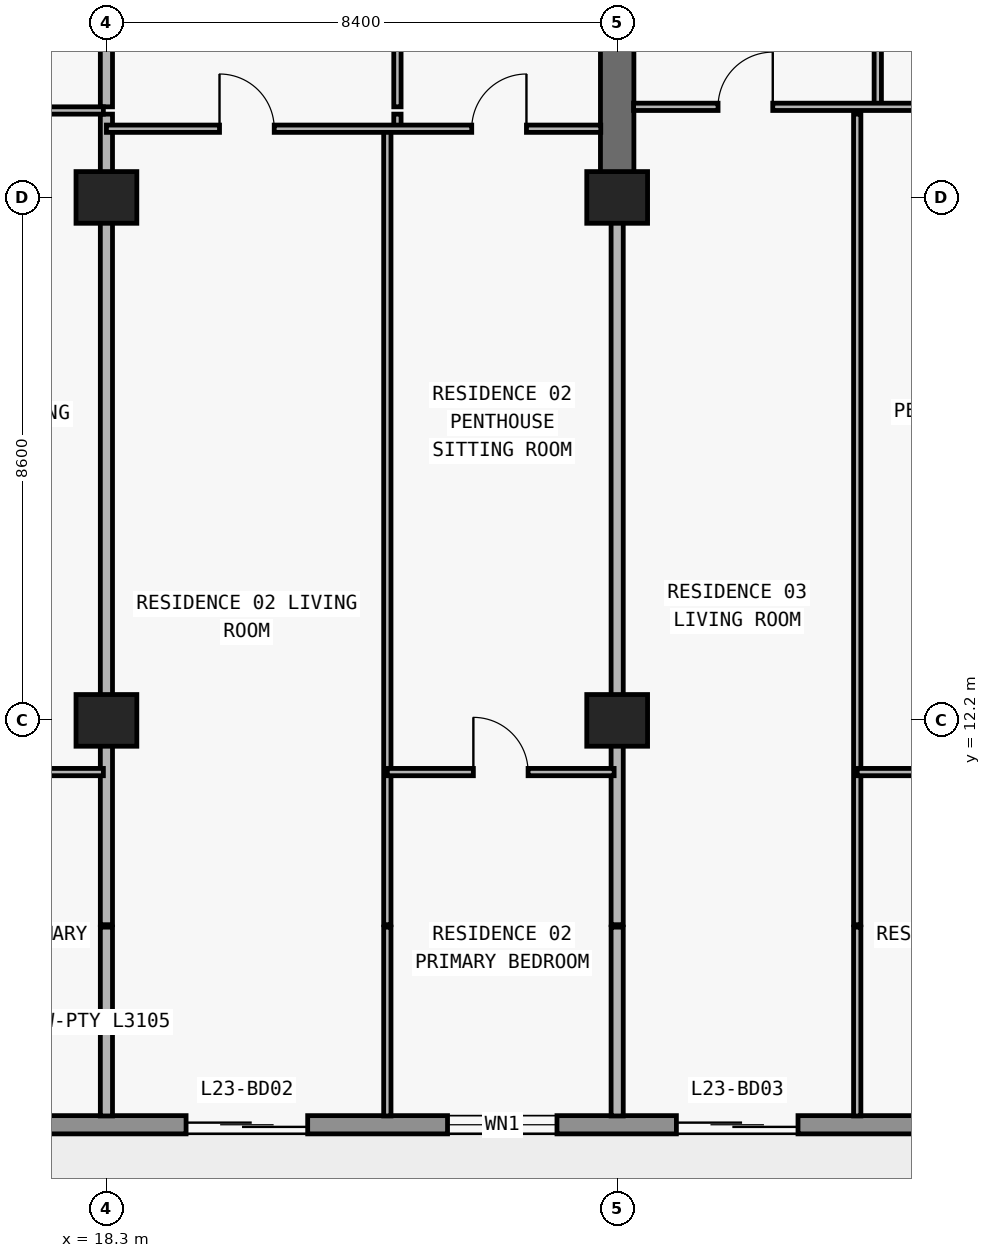
"""IFC4 building model, lengths in metres.
Left out: names, types, materials, properties, quantities, classifications, styles, units other than length and angle.
Written with IfcOpenShell. Run it as: python <this file> out.ifc"""

import sys

from ifc_helpers import new_model, si_unit, direction, frame, frame_2d, origin, origin_2d, place, context, subcontext, project, spatial, rectangle, extrude, element, fill, save


model = new_model("IFC4")
c1 = context("Model", 3, precision=1e-05, world=origin(), true_north=direction((0.0, 1.0)))
c2 = subcontext(c1, "Body", "Model", "MODEL_VIEW")
j1 = project(units=[si_unit("LENGTHUNIT", "METRE"), si_unit("PLANEANGLEUNIT", "RADIAN")], contexts=[c1])
p1 = place(None, origin())
s1 = spatial("IfcSite", under=j1, at=p1, CompositionType="ELEMENT")
p2 = place(p1, origin())
s2 = spatial("IfcBuilding", under=s1, at=p2, CompositionType="ELEMENT")
p3 = place(p2, frame((0.0, 0.0, 87.9)))
s3 = spatial("IfcBuildingStorey", under=s2, at=p3, CompositionType="ELEMENT", Elevation=87.9)
for number, where, z_axis, x_axis in (
    (1, (18.3, 12.2, 0.0), (0.0, 0.0, 1.0), (1.0, 0.0, 0.0)),
    (2, (26.7, 12.2, 0.0), (0.0, 0.0, 1.0), (1.0, 0.0, 0.0)),
    (3, (18.3, 20.8, 0.0), (0.0, 0.0, 1.0), (1.0, 0.0, 0.0)),
    (4, (26.7, 20.8, 0.0), (0.0, 0.0, 1.0), (1.0, 0.0, 0.0)),
):
    element("IfcColumn", number, at=place(p3, frame(where, z_axis=z_axis, x_axis=x_axis)), inside=s3, PredefinedType="COLUMN", context=c2, shape_type="SweptSolid", body=[
        extrude(rectangle(XDim=1.0, YDim=0.85, at=origin_2d()), origin(), (0.0, 0.0, 1.0), 3.05),
    ])
p4 = place(p3, frame((26.7, 20.8, 0.0), z_axis=(0.0, 0.0, 1.0), x_axis=(0.0, 1.0, 0.0)))
e5 = element("IfcWall", 5, at=p4, inside=s3, PredefinedType="SHEAR", context=c2, shape_type="SweptSolid", body=[
    extrude(rectangle(XDim=8.6, YDim=0.55, at=frame_2d((4.3, 0.0))), origin(), (0.0, 0.0, 1.0), 3.05),
])
p5 = place(p3, frame((70.1, 5.55, 0.0), z_axis=(0.0, 0.0, 1.0), x_axis=(-1.0, 0.0, 0.0)))
e6 = element("IfcWall", 6, at=p5, inside=s3, PredefinedType="STANDARD", context=c2, shape_type="SweptSolid", body=[
    extrude(rectangle(XDim=62.4, YDim=0.3, at=frame_2d((31.2, 0.0))), origin(), (0.0, 0.0, 1.0), 3.05),
])
p6 = place(p5, frame((57.226, 0.0, 0.0)))
e7 = element("IfcOpeningElement", 7, at=p6, cuts=e6, PredefinedType="OPENING", context=c2, shape_type="SweptSolid", body=[
    extrude(rectangle(XDim=2.0, YDim=2.3, at=frame_2d((1.0, 1.15))), frame((0.0, 0.16, 0.0), z_axis=(0.0, -1.0, 0.0), x_axis=(1.0, 0.0, 0.0)), (0.0, 0.0, 1.0), 0.32),
])
p7 = place(p5, frame((52.926, 0.0, 0.85)))
e8 = element("IfcOpeningElement", 8, at=p7, cuts=e6, PredefinedType="OPENING", context=c2, shape_type="SweptSolid", body=[
    extrude(rectangle(XDim=2.2, YDim=1.55, at=frame_2d((1.1, 0.775))), frame((0.0, 0.16, 0.0), z_axis=(0.0, -1.0, 0.0), x_axis=(1.0, 0.0, 0.0)), (0.0, 0.0, 1.0), 0.32),
])
p8 = place(p5, frame((48.49, 0.0, 0.0)))
e9 = element("IfcOpeningElement", 9, at=p8, cuts=e6, PredefinedType="OPENING", context=c2, shape_type="SweptSolid", body=[
    extrude(rectangle(XDim=2.0, YDim=2.3, at=frame_2d((1.0, 1.15))), frame((0.0, 0.16, 0.0), z_axis=(0.0, -1.0, 0.0), x_axis=(1.0, 0.0, 0.0)), (0.0, 0.0, 1.0), 0.32),
])
p9 = place(p5, frame((44.39, 0.0, 0.85)))
e10 = element("IfcOpeningElement", 10, at=p9, cuts=e6, PredefinedType="OPENING", context=c2, shape_type="SweptSolid", body=[
    extrude(rectangle(XDim=1.8, YDim=1.55, at=frame_2d((0.9, 0.775))), frame((0.0, 0.16, 0.0), z_axis=(0.0, -1.0, 0.0), x_axis=(1.0, 0.0, 0.0)), (0.0, 0.0, 1.0), 0.32),
])
p10 = place(p5, frame((40.426, 0.0, 0.0)))
e11 = element("IfcOpeningElement", 11, at=p10, cuts=e6, PredefinedType="OPENING", context=c2, shape_type="SweptSolid", body=[
    extrude(rectangle(XDim=2.0, YDim=2.3, at=frame_2d((1.0, 1.15))), frame((0.0, 0.16, 0.0), z_axis=(0.0, -1.0, 0.0), x_axis=(1.0, 0.0, 0.0)), (0.0, 0.0, 1.0), 0.32),
])
p11 = place(p5, frame((36.126, 0.0, 0.85)))
e12 = element("IfcOpeningElement", 12, at=p11, cuts=e6, PredefinedType="OPENING", context=c2, shape_type="SweptSolid", body=[
    extrude(rectangle(XDim=2.2, YDim=1.55, at=frame_2d((1.1, 0.775))), frame((0.0, 0.16, 0.0), z_axis=(0.0, -1.0, 0.0), x_axis=(1.0, 0.0, 0.0)), (0.0, 0.0, 1.0), 0.32),
])
p12 = place(p5, frame((32.09, 0.0, 0.0)))
e13 = element("IfcOpeningElement", 13, at=p12, cuts=e6, PredefinedType="OPENING", context=c2, shape_type="SweptSolid", body=[
    extrude(rectangle(XDim=2.0, YDim=2.3, at=frame_2d((1.0, 1.15))), frame((0.0, 0.16, 0.0), z_axis=(0.0, -1.0, 0.0), x_axis=(1.0, 0.0, 0.0)), (0.0, 0.0, 1.0), 0.32),
])
p13 = place(p5, frame((28.21, 0.0, 0.65)))
e14 = element("IfcOpeningElement", 14, at=p13, cuts=e6, PredefinedType="OPENING", context=c2, shape_type="SweptSolid", body=[
    extrude(rectangle(XDim=2.6, YDim=1.85, at=frame_2d((1.3, 0.925))), frame((0.0, 0.16, 0.0), z_axis=(0.0, -1.0, 0.0), x_axis=(1.0, 0.0, 0.0)), (0.0, 0.0, 1.0), 0.32),
])
p14 = place(p5, frame((22.1, 0.0, 0.85)))
e15 = element("IfcOpeningElement", 15, at=p14, cuts=e6, PredefinedType="OPENING", context=c2, shape_type="SweptSolid", body=[
    extrude(rectangle(XDim=2.2, YDim=1.55, at=frame_2d((1.1, 0.775))), frame((0.0, 0.16, 0.0), z_axis=(0.0, -1.0, 0.0), x_axis=(1.0, 0.0, 0.0)), (0.0, 0.0, 1.0), 0.32),
])
p15 = place(p5, frame((16.026, 0.0, 0.0)))
e16 = element("IfcOpeningElement", 16, at=p15, cuts=e6, PredefinedType="OPENING", context=c2, shape_type="SweptSolid", body=[
    extrude(rectangle(XDim=2.0, YDim=2.3, at=frame_2d((1.0, 1.15))), frame((0.0, 0.16, 0.0), z_axis=(0.0, -1.0, 0.0), x_axis=(1.0, 0.0, 0.0)), (0.0, 0.0, 1.0), 0.32),
])
p16 = place(p5, frame((11.726, 0.0, 0.85)))
e17 = element("IfcOpeningElement", 17, at=p16, cuts=e6, PredefinedType="OPENING", context=c2, shape_type="SweptSolid", body=[
    extrude(rectangle(XDim=2.2, YDim=1.55, at=frame_2d((1.1, 0.775))), frame((0.0, 0.16, 0.0), z_axis=(0.0, -1.0, 0.0), x_axis=(1.0, 0.0, 0.0)), (0.0, 0.0, 1.0), 0.32),
])
p17 = place(p5, frame((7.29, 0.0, 0.0)))
e18 = element("IfcOpeningElement", 18, at=p17, cuts=e6, PredefinedType="OPENING", context=c2, shape_type="SweptSolid", body=[
    extrude(rectangle(XDim=2.0, YDim=2.3, at=frame_2d((1.0, 1.15))), frame((0.0, 0.16, 0.0), z_axis=(0.0, -1.0, 0.0), x_axis=(1.0, 0.0, 0.0)), (0.0, 0.0, 1.0), 0.32),
])
p18 = place(p5, frame((3.19, 0.0, 0.85)))
e19 = element("IfcOpeningElement", 19, at=p18, cuts=e6, PredefinedType="OPENING", context=c2, shape_type="SweptSolid", body=[
    extrude(rectangle(XDim=1.8, YDim=1.55, at=frame_2d((0.9, 0.775))), frame((0.0, 0.16, 0.0), z_axis=(0.0, -1.0, 0.0), x_axis=(1.0, 0.0, 0.0)), (0.0, 0.0, 1.0), 0.32),
])
p19 = place(p3, frame((18.3, 5.695, 0.0), z_axis=(0.0, 0.0, 1.0), x_axis=(0.0, 1.0, 0.0)))
e20 = element("IfcWall", 20, at=p19, inside=s3, PredefinedType="PARTITIONING", context=c2, shape_type="SweptSolid", body=[
    extrude(rectangle(XDim=3.105, YDim=0.2, at=frame_2d((1.552, 0.0))), origin(), (0.0, 0.0, 1.0), 3.05),
])
p20 = place(p3, frame((18.3, 8.84, 0.0), z_axis=(0.0, 0.0, 1.0), x_axis=(0.0, 1.0, 0.0)))
e21 = element("IfcWall", 21, at=p20, inside=s3, PredefinedType="PARTITIONING", context=c2, shape_type="SweptSolid", body=[
    extrude(rectangle(XDim=13.33, YDim=0.2, at=frame_2d((6.665, 0.0))), origin(), (0.0, 0.0, 1.0), 2.174),
])
p21 = place(p3, frame((18.3, 22.29, 0.0), z_axis=(0.0, 0.0, 1.0), x_axis=(0.0, 1.0, 0.0)))
e22 = element("IfcWall", 22, at=p21, inside=s3, PredefinedType="PARTITIONING", context=c2, shape_type="SweptSolid", body=[
    extrude(rectangle(XDim=4.69, YDim=0.2, at=frame_2d((2.345, 0.0))), origin(), (0.0, 0.0, 1.0), 2.174),
])
p22 = place(p3, frame((22.92, 5.695, 0.0), z_axis=(0.0, 0.0, 1.0), x_axis=(0.0, 1.0, 0.0)))
e23 = element("IfcWall", 23, at=p22, inside=s3, PredefinedType="PARTITIONING", context=c2, shape_type="SweptSolid", body=[
    extrude(rectangle(XDim=3.105, YDim=0.12, at=frame_2d((1.552, 0.0))), origin(), (0.0, 0.0, 1.0), 3.05),
])
p23 = place(p3, frame((22.92, 8.84, 0.0), z_axis=(0.0, 0.0, 1.0), x_axis=(0.0, 1.0, 0.0)))
e24 = element("IfcWall", 24, at=p23, inside=s3, PredefinedType="PARTITIONING", context=c2, shape_type="SweptSolid", body=[
    extrude(rectangle(XDim=13.09, YDim=0.12, at=frame_2d((6.545, 0.0))), origin(), (0.0, 0.0, 1.0), 3.05),
])
p24 = place(p3, frame((23.086, 21.935, 0.0), z_axis=(0.0, 0.0, 1.0), x_axis=(0.0, 1.0, 0.0)))
e25 = element("IfcWall", 25, at=p24, inside=s3, PredefinedType="PARTITIONING", context=c2, shape_type="SweptSolid", body=[
    extrude(rectangle(XDim=0.235, YDim=0.12, at=frame_2d((0.117, 0.0))), origin(), (0.0, 0.0, 1.0), 3.05),
])
p25 = place(p3, frame((23.086, 22.29, 0.0), z_axis=(0.0, 0.0, 1.0), x_axis=(0.0, 1.0, 0.0)))
e26 = element("IfcWall", 26, at=p25, inside=s3, PredefinedType="PARTITIONING", context=c2, shape_type="SweptSolid", body=[
    extrude(rectangle(XDim=4.69, YDim=0.12, at=frame_2d((2.345, 0.0))), origin(), (0.0, 0.0, 1.0), 3.05),
])
p26 = place(p25, frame((1.895, 0.0, 0.0)))
e27 = element("IfcOpeningElement", 27, at=p26, cuts=e26, PredefinedType="OPENING", context=c2, shape_type="SweptSolid", body=[
    extrude(rectangle(XDim=0.9, YDim=2.15, at=frame_2d((0.45, 1.075))), frame((0.0, 0.07, 0.0), z_axis=(0.0, -1.0, 0.0), x_axis=(1.0, 0.0, 0.0)), (0.0, 0.0, 1.0), 0.14),
])
p27 = place(p3, frame((26.7, 5.695, 0.0), z_axis=(0.0, 0.0, 1.0), x_axis=(0.0, 1.0, 0.0)))
e28 = element("IfcWall", 28, at=p27, inside=s3, PredefinedType="PARTITIONING", context=c2, shape_type="SweptSolid", body=[
    extrude(rectangle(XDim=3.105, YDim=0.2, at=frame_2d((1.552, 0.0))), origin(), (0.0, 0.0, 1.0), 3.05),
])
p28 = place(p3, frame((26.7, 8.84, 0.0), z_axis=(0.0, 0.0, 1.0), x_axis=(0.0, 1.0, 0.0)))
e29 = element("IfcWall", 29, at=p28, inside=s3, PredefinedType="PARTITIONING", context=c2, shape_type="SweptSolid", body=[
    extrude(rectangle(XDim=11.955, YDim=0.2, at=frame_2d((5.978, 0.0))), origin(), (0.0, 0.0, 1.0), 2.174),
])
p29 = place(p3, frame((30.648, 5.695, 0.0), z_axis=(0.0, 0.0, 1.0), x_axis=(0.0, 1.0, 0.0)))
e30 = element("IfcWall", 30, at=p29, inside=s3, PredefinedType="PARTITIONING", context=c2, shape_type="SweptSolid", body=[
    extrude(rectangle(XDim=3.105, YDim=0.12, at=frame_2d((1.552, 0.0))), origin(), (0.0, 0.0, 1.0), 3.05),
])
p30 = place(p3, frame((30.648, 8.84, 0.0), z_axis=(0.0, 0.0, 1.0), x_axis=(0.0, 1.0, 0.0)))
e31 = element("IfcWall", 31, at=p30, inside=s3, PredefinedType="PARTITIONING", context=c2, shape_type="SweptSolid", body=[
    extrude(rectangle(XDim=13.33, YDim=0.12, at=frame_2d((6.665, 0.0))), origin(), (0.0, 0.0, 1.0), 3.05),
])
p31 = place(p3, frame((30.986, 22.29, 0.0), z_axis=(0.0, 0.0, 1.0), x_axis=(0.0, 1.0, 0.0)))
e32 = element("IfcWall", 32, at=p31, inside=s3, PredefinedType="PARTITIONING", context=c2, shape_type="SweptSolid", body=[
    extrude(rectangle(XDim=4.69, YDim=0.12, at=frame_2d((2.345, 0.0))), origin(), (0.0, 0.0, 1.0), 3.05),
])
p32 = place(p31, frame((1.895, 0.0, 0.0)))
e33 = element("IfcOpeningElement", 33, at=p32, cuts=e32, PredefinedType="OPENING", context=c2, shape_type="SweptSolid", body=[
    extrude(rectangle(XDim=0.9, YDim=2.15, at=frame_2d((0.45, 1.075))), frame((0.0, 0.07, 0.0), z_axis=(0.0, -1.0, 0.0), x_axis=(1.0, 0.0, 0.0)), (0.0, 0.0, 1.0), 0.14),
])
p33 = place(p3, frame((13.848, 11.35, 0.0), z_axis=(0.0, 0.0, 1.0), x_axis=(1.0, 0.0, 0.0)))
e34 = element("IfcWall", 34, at=p33, inside=s3, PredefinedType="PARTITIONING", context=c2, shape_type="SweptSolid", body=[
    extrude(rectangle(XDim=4.402, YDim=0.12, at=frame_2d((2.201, 0.0))), origin(), (0.0, 0.0, 1.0), 3.05),
])
p34 = place(p33, frame((1.751, 0.0, 0.0)))
e35 = element("IfcOpeningElement", 35, at=p34, cuts=e34, PredefinedType="OPENING", context=c2, shape_type="SweptSolid", body=[
    extrude(rectangle(XDim=0.9, YDim=2.15, at=frame_2d((0.45, 1.075))), frame((0.0, 0.07, 0.0), z_axis=(0.0, -1.0, 0.0), x_axis=(1.0, 0.0, 0.0)), (0.0, 0.0, 1.0), 0.14),
])
p35 = place(p3, frame((22.92, 11.35, 0.0), z_axis=(0.0, 0.0, 1.0), x_axis=(1.0, 0.0, 0.0)))
e36 = element("IfcWall", 36, at=p35, inside=s3, PredefinedType="PARTITIONING", context=c2, shape_type="SweptSolid", body=[
    extrude(rectangle(XDim=3.73, YDim=0.12, at=frame_2d((1.865, 0.0))), origin(), (0.0, 0.0, 1.0), 3.05),
])
p36 = place(p35, frame((1.415, 0.0, 0.0)))
e37 = element("IfcOpeningElement", 37, at=p36, cuts=e36, PredefinedType="OPENING", context=c2, shape_type="SweptSolid", body=[
    extrude(rectangle(XDim=0.9, YDim=2.15, at=frame_2d((0.45, 1.075))), frame((0.0, 0.07, 0.0), z_axis=(0.0, -1.0, 0.0), x_axis=(1.0, 0.0, 0.0)), (0.0, 0.0, 1.0), 0.14),
])
p37 = place(p3, frame((30.648, 11.35, 0.0), z_axis=(0.0, 0.0, 1.0), x_axis=(1.0, 0.0, 0.0)))
e38 = element("IfcWall", 38, at=p37, inside=s3, PredefinedType="PARTITIONING", context=c2, shape_type="SweptSolid", body=[
    extrude(rectangle(XDim=4.452, YDim=0.12, at=frame_2d((2.226, 0.0))), origin(), (0.0, 0.0, 1.0), 3.05),
])
p38 = place(p37, frame((1.776, 0.0, 0.0)))
e39 = element("IfcOpeningElement", 39, at=p38, cuts=e38, PredefinedType="OPENING", context=c2, shape_type="SweptSolid", body=[
    extrude(rectangle(XDim=0.9, YDim=2.15, at=frame_2d((0.45, 1.075))), frame((0.0, 0.07, 0.0), z_axis=(0.0, -1.0, 0.0), x_axis=(1.0, 0.0, 0.0)), (0.0, 0.0, 1.0), 0.14),
])
p39 = place(p3, frame((18.3, 21.93, 0.0), z_axis=(0.0, 0.0, 1.0), x_axis=(1.0, 0.0, 0.0)))
e40 = element("IfcWall", 40, at=p39, inside=s3, PredefinedType="PARTITIONING", context=c2, shape_type="SweptSolid", body=[
    extrude(rectangle(XDim=8.13, YDim=0.12, at=frame_2d((4.065, 0.0))), origin(), (0.0, 0.0, 1.0), 3.05),
])
p40 = place(p39, frame((1.86, 0.0, 0.0)))
e41 = element("IfcOpeningElement", 41, at=p40, cuts=e40, PredefinedType="OPENING", context=c2, shape_type="SweptSolid", body=[
    extrude(rectangle(XDim=0.9, YDim=2.15, at=frame_2d((0.45, 1.075))), frame((0.0, 0.07, 0.0), z_axis=(0.0, -1.0, 0.0), x_axis=(1.0, 0.0, 0.0)), (0.0, 0.0, 1.0), 0.14),
])
p41 = place(p39, frame((6.008, 0.0, 0.0)))
e42 = element("IfcOpeningElement", 42, at=p41, cuts=e40, PredefinedType="OPENING", context=c2, shape_type="SweptSolid", body=[
    extrude(rectangle(XDim=0.9, YDim=2.15, at=frame_2d((0.45, 1.075))), frame((0.0, 0.07, 0.0), z_axis=(0.0, -1.0, 0.0), x_axis=(1.0, 0.0, 0.0)), (0.0, 0.0, 1.0), 0.14),
])
p42 = place(p3, frame((9.9, 22.23, 0.0), z_axis=(0.0, 0.0, 1.0), x_axis=(1.0, 0.0, 0.0)))
e43 = element("IfcWall", 43, at=p42, inside=s3, PredefinedType="PARTITIONING", context=c2, shape_type="SweptSolid", body=[
    extrude(rectangle(XDim=8.35, YDim=0.12, at=frame_2d((4.175, 0.0))), origin(), (0.0, 0.0, 1.0), 3.05),
])
p43 = place(p42, frame((1.524, 0.0, 0.0)))
e44 = element("IfcOpeningElement", 44, at=p43, cuts=e43, PredefinedType="OPENING", context=c2, shape_type="SweptSolid", body=[
    extrude(rectangle(XDim=0.9, YDim=2.15, at=frame_2d((0.45, 1.075))), frame((0.0, 0.07, 0.0), z_axis=(0.0, -1.0, 0.0), x_axis=(1.0, 0.0, 0.0)), (0.0, 0.0, 1.0), 0.14),
])
p44 = place(p42, frame((5.993, 0.0, 0.0)))
e45 = element("IfcOpeningElement", 45, at=p44, cuts=e43, PredefinedType="OPENING", context=c2, shape_type="SweptSolid", body=[
    extrude(rectangle(XDim=0.9, YDim=2.15, at=frame_2d((0.45, 1.075))), frame((0.0, 0.07, 0.0), z_axis=(0.0, -1.0, 0.0), x_axis=(1.0, 0.0, 0.0)), (0.0, 0.0, 1.0), 0.14),
])
p45 = place(p3, frame((26.97, 22.29, 0.0), z_axis=(0.0, 0.0, 1.0), x_axis=(1.0, 0.0, 0.0)))
e46 = element("IfcWall", 46, at=p45, inside=s3, PredefinedType="PARTITIONING", context=c2, shape_type="SweptSolid", body=[
    extrude(rectangle(XDim=8.125, YDim=0.12, at=frame_2d((4.062, 0.0))), origin(), (0.0, 0.0, 1.0), 3.05),
])
p46 = place(p45, frame((1.389, 0.0, 0.0)))
e47 = element("IfcOpeningElement", 47, at=p46, cuts=e46, PredefinedType="OPENING", context=c2, shape_type="SweptSolid", body=[
    extrude(rectangle(XDim=0.9, YDim=2.15, at=frame_2d((0.45, 1.075))), frame((0.0, 0.07, 0.0), z_axis=(0.0, -1.0, 0.0), x_axis=(1.0, 0.0, 0.0)), (0.0, 0.0, 1.0), 0.14),
])
p47 = place(p45, frame((5.621, 0.0, 0.0)))
e48 = element("IfcOpeningElement", 48, at=p47, cuts=e46, PredefinedType="OPENING", context=c2, shape_type="SweptSolid", body=[
    extrude(rectangle(XDim=0.9, YDim=2.15, at=frame_2d((0.45, 1.075))), frame((0.0, 0.07, 0.0), z_axis=(0.0, -1.0, 0.0), x_axis=(1.0, 0.0, 0.0)), (0.0, 0.0, 1.0), 0.14),
])
p48 = place(p8, origin())
e49 = element("IfcDoor", 49, at=p48, inside=s3, OperationType="DOUBLE_DOOR_SLIDING", PredefinedType="DOOR", context=c2, shape_type="SweptSolid", body=[
    extrude(rectangle(XDim=2.0, YDim=2.3, at=frame_2d((1.0, 1.15))), frame((0.0, 0.025, 0.0), z_axis=(0.0, -1.0, 0.0), x_axis=(1.0, 0.0, 0.0)), (0.0, 0.0, 1.0), 0.05),
])
fill(e9, e49)
p49 = place(p9, origin())
e50 = element("IfcWindow", 50, at=p49, inside=s3, PartitioningType="SINGLE_PANEL", PredefinedType="WINDOW", context=c2, shape_type="SweptSolid", body=[
    extrude(rectangle(XDim=1.8, YDim=1.55, at=frame_2d((0.9, 0.775))), frame((0.0, 0.03, 0.0), z_axis=(0.0, -1.0, 0.0), x_axis=(1.0, 0.0, 0.0)), (0.0, 0.0, 1.0), 0.06),
])
fill(e10, e50)
p50 = place(p10, origin())
e51 = element("IfcDoor", 51, at=p50, inside=s3, OperationType="DOUBLE_DOOR_SLIDING", PredefinedType="DOOR", context=c2, shape_type="SweptSolid", body=[
    extrude(rectangle(XDim=2.0, YDim=2.3, at=frame_2d((1.0, 1.15))), frame((0.0, 0.025, 0.0), z_axis=(0.0, -1.0, 0.0), x_axis=(1.0, 0.0, 0.0)), (0.0, 0.0, 1.0), 0.05),
])
fill(e11, e51)
p51 = place(p40, origin())
e52 = element("IfcDoor", 52, at=p51, inside=s3, OperationType="SINGLE_SWING_LEFT", PredefinedType="DOOR", context=c2, shape_type="SweptSolid", body=[
    extrude(rectangle(XDim=0.9, YDim=2.15, at=frame_2d((0.45, 1.075))), frame((0.0, 0.025, 0.0), z_axis=(0.0, -1.0, 0.0), x_axis=(1.0, 0.0, 0.0)), (0.0, 0.0, 1.0), 0.05),
])
fill(e41, e52)
p52 = place(p41, origin())
e53 = element("IfcDoor", 53, at=p52, inside=s3, OperationType="SINGLE_SWING_RIGHT", PredefinedType="DOOR", context=c2, shape_type="SweptSolid", body=[
    extrude(rectangle(XDim=0.9, YDim=2.15, at=frame_2d((0.45, 1.075))), frame((0.0, 0.025, 0.0), z_axis=(0.0, -1.0, 0.0), x_axis=(1.0, 0.0, 0.0)), (0.0, 0.0, 1.0), 0.05),
])
fill(e42, e53)
p53 = place(p36, origin())
e54 = element("IfcDoor", 54, at=p53, inside=s3, OperationType="SINGLE_SWING_LEFT", PredefinedType="DOOR", context=c2, shape_type="SweptSolid", body=[
    extrude(rectangle(XDim=0.9, YDim=2.15, at=frame_2d((0.45, 1.075))), frame((0.0, 0.025, 0.0), z_axis=(0.0, -1.0, 0.0), x_axis=(1.0, 0.0, 0.0)), (0.0, 0.0, 1.0), 0.05),
])
fill(e37, e54)
p54 = place(p46, origin())
e55 = element("IfcDoor", 55, at=p54, inside=s3, OperationType="SINGLE_SWING_RIGHT", PredefinedType="DOOR", context=c2, shape_type="SweptSolid", body=[
    extrude(rectangle(XDim=0.9, YDim=2.15, at=frame_2d((0.45, 1.075))), frame((0.0, 0.025, 0.0), z_axis=(0.0, -1.0, 0.0), x_axis=(1.0, 0.0, 0.0)), (0.0, 0.0, 1.0), 0.05),
])
fill(e47, e55)
save(model, sys.argv[1])
